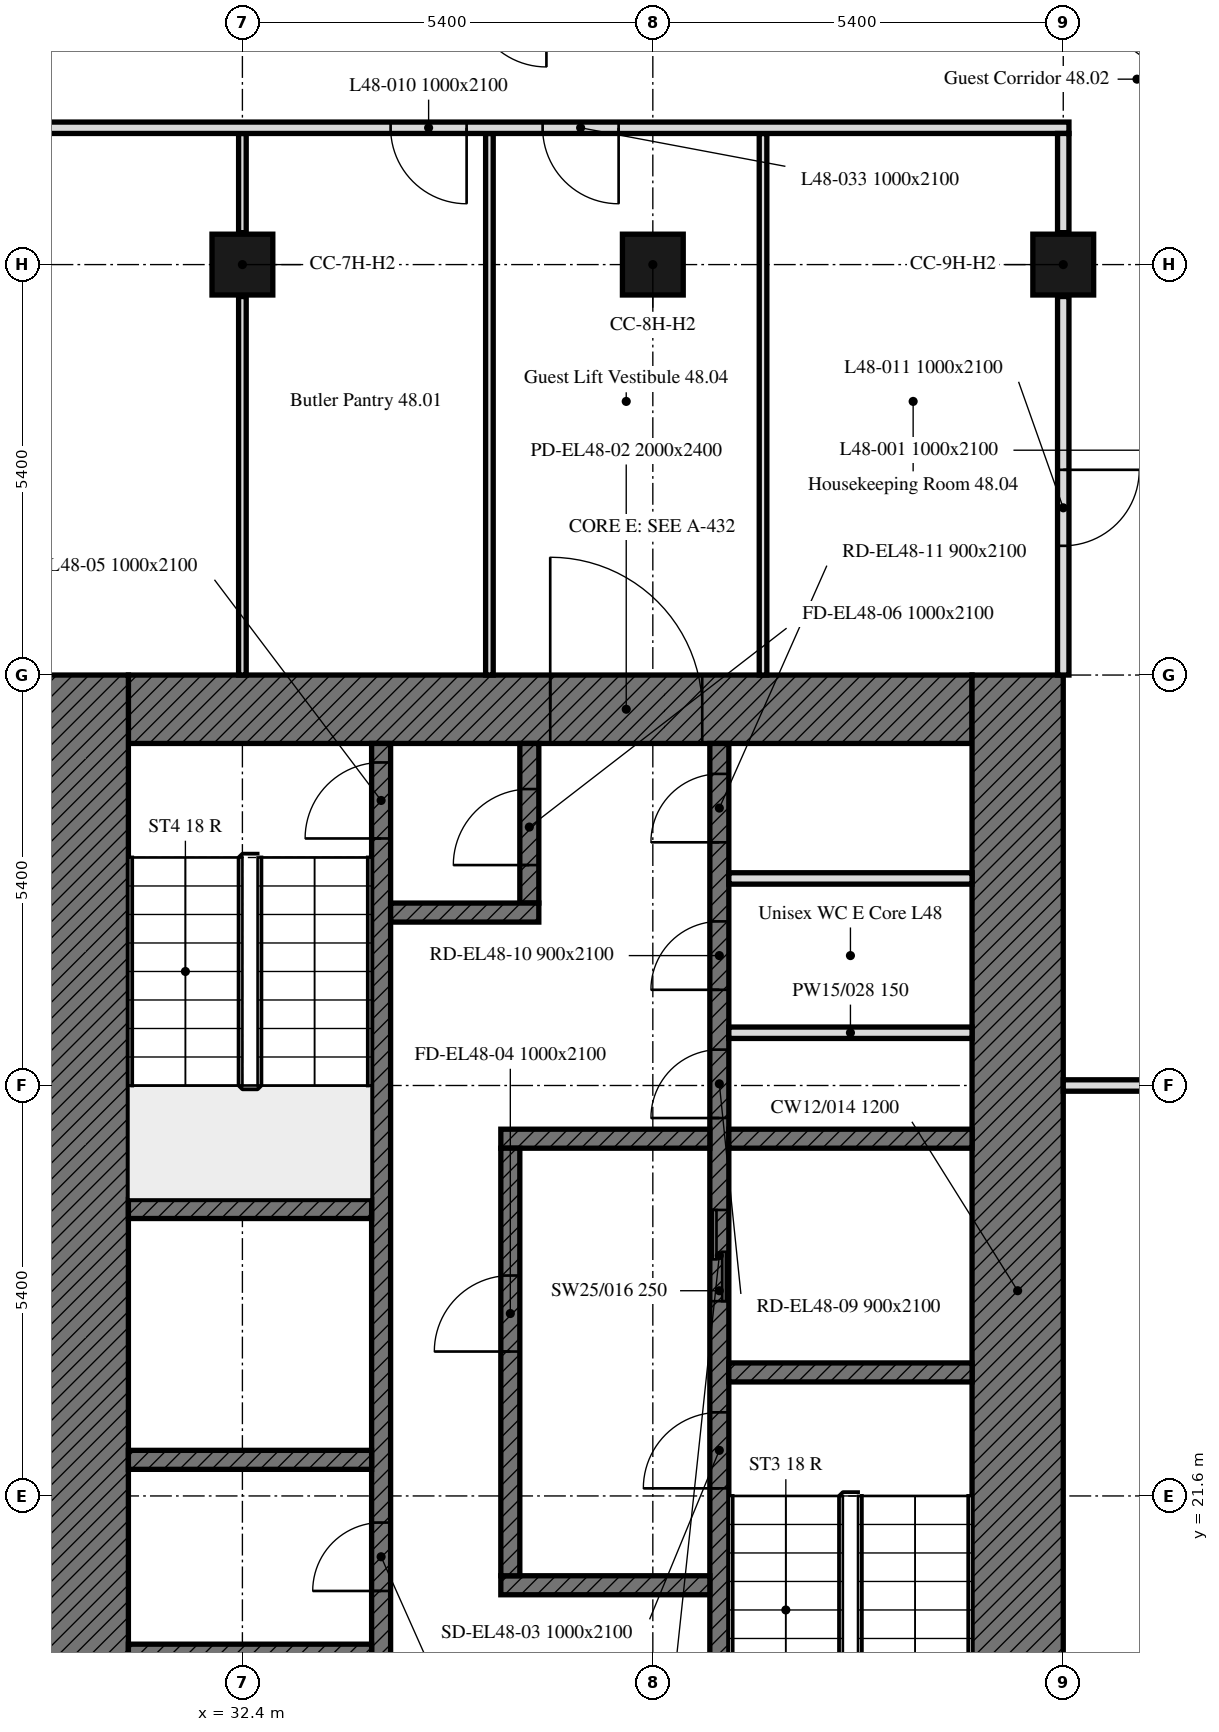
"""IFC4 building model, lengths in metres.
Left out: names, types, materials, properties, quantities, classifications, styles, units other than length and angle.
Written with IfcOpenShell. Run it as: python <this file> out.ifc"""

import sys

from ifc_helpers import new_model, si_unit, direction, frame, frame_2d, origin, origin_2d, place, context, subcontext, project, spatial, rectangle, extrude, element, fill, save


model = new_model("IFC4")
c1 = context("Model", 3, precision=1e-05, world=origin(), true_north=direction((0.0, 1.0)))
c2 = subcontext(c1, "Body", "Model", "MODEL_VIEW")
j1 = project(units=[si_unit("LENGTHUNIT", "METRE"), si_unit("PLANEANGLEUNIT", "RADIAN")], contexts=[c1])
p1 = place(None, origin())
s1 = spatial("IfcSite", under=j1, at=p1, CompositionType="ELEMENT")
p2 = place(p1, origin())
s2 = spatial("IfcBuilding", under=s1, at=p2, CompositionType="ELEMENT")
p3 = place(p2, frame((0.0, 0.0, 197.2)))
s3 = spatial("IfcBuildingStorey", under=s2, at=p3, CompositionType="ELEMENT", Elevation=197.2)
for number, where, z_axis, x_axis in (
    (1, (32.4, 37.8, 0.0), (0.0, 0.0, 1.0), (1.0, 0.0, 0.0)),
    (2, (37.8, 37.8, 0.0), (0.0, 0.0, 1.0), (1.0, 0.0, 0.0)),
    (3, (43.2, 37.8, 0.0), (0.0, 0.0, 1.0), (1.0, 0.0, 0.0)),
):
    element("IfcColumn", number, at=place(p3, frame(where, z_axis=z_axis, x_axis=x_axis)), inside=s3, PredefinedType="COLUMN", context=c2, shape_type="SweptSolid", body=[
        extrude(rectangle(XDim=0.8, YDim=0.8, at=origin_2d()), origin(), (0.0, 0.0, 1.0), 3.0),
    ])
p4 = place(p3, frame((30.9, 31.95, 0.0), z_axis=(0.0, 0.0, 1.0), x_axis=(1.0, 0.0, 0.0)))
e4 = element("IfcWall", 4, at=p4, inside=s3, PredefinedType="SOLIDWALL", context=c2, shape_type="SweptSolid", body=[
    extrude(rectangle(XDim=11.1, YDim=0.9, at=frame_2d((5.55, 0.0))), origin(), (0.0, 0.0, 1.0), 3.0),
])
p5 = place(p4, frame((5.55, 0.0, 0.0)))
e5 = element("IfcOpeningElement", 5, at=p5, cuts=e4, PredefinedType="OPENING", context=c2, shape_type="SweptSolid", body=[
    extrude(rectangle(XDim=2.0, YDim=2.4, at=frame_2d((1.0, 1.2))), frame((0.0, 0.45, 0.0), z_axis=(0.0, -1.0, 0.0), x_axis=(1.0, 0.0, 0.0)), (0.0, 0.0, 1.0), 0.9),
])
for number, where, z_axis, x_axis in (
    (6, (42.6, 32.4, 0.0), (0.0, 0.0, 1.0), (0.0, -1.0, 0.0)),
    (7, (30.3, 16.2, 0.0), (0.0, 0.0, 1.0), (0.0, 1.0, 0.0)),
):
    element("IfcWall", number, at=place(p3, frame(where, z_axis=z_axis, x_axis=x_axis)), inside=s3, PredefinedType="SOLIDWALL", context=c2, shape_type="SweptSolid", body=[
        extrude(rectangle(XDim=16.2, YDim=1.2, at=frame_2d((8.1, 0.0))), origin(), (0.0, 0.0, 1.0), 3.0),
    ])
p6 = place(p3, frame((38.675, 17.1, 0.0), z_axis=(0.0, 0.0, 1.0), x_axis=(0.0, 1.0, 0.0)))
e8 = element("IfcWall", 8, at=p6, inside=s3, PredefinedType="SOLIDWALL", context=c2, shape_type="SweptSolid", body=[
    extrude(rectangle(XDim=14.4, YDim=0.25, at=frame_2d((7.2, 0.0))), origin(), (0.0, 0.0, 1.0), 3.0),
])
p7 = place(p6, frame((4.6, 0.0, 0.0)))
e9 = element("IfcOpeningElement", 9, at=p7, cuts=e8, PredefinedType="OPENING", context=c2, shape_type="SweptSolid", body=[
    extrude(rectangle(XDim=1.0, YDim=2.1, at=frame_2d((0.5, 1.05))), frame((0.0, 0.125, 0.0), z_axis=(0.0, -1.0, 0.0), x_axis=(1.0, 0.0, 0.0)), (0.0, 0.0, 1.0), 0.25),
])
p8 = place(p6, frame((7.062, 0.0, 0.0)))
e10 = element("IfcOpeningElement", 10, at=p8, cuts=e8, PredefinedType="OPENING", context=c2, shape_type="SweptSolid", body=[
    extrude(rectangle(XDim=1.2, YDim=2.1, at=frame_2d((0.6, 1.05))), frame((0.0, 0.125, 0.0), z_axis=(0.0, -1.0, 0.0), x_axis=(1.0, 0.0, 0.0)), (0.0, 0.0, 1.0), 0.25),
])
p9 = place(p6, frame((9.472, 0.0, 0.0)))
e11 = element("IfcOpeningElement", 11, at=p9, cuts=e8, PredefinedType="OPENING", context=c2, shape_type="SweptSolid", body=[
    extrude(rectangle(XDim=0.9, YDim=2.1, at=frame_2d((0.45, 1.05))), frame((0.0, 0.125, 0.0), z_axis=(0.0, -1.0, 0.0), x_axis=(1.0, 0.0, 0.0)), (0.0, 0.0, 1.0), 0.25),
])
p10 = place(p6, frame((11.159, 0.0, 0.0)))
e12 = element("IfcOpeningElement", 12, at=p10, cuts=e8, PredefinedType="OPENING", context=c2, shape_type="SweptSolid", body=[
    extrude(rectangle(XDim=0.9, YDim=2.1, at=frame_2d((0.45, 1.05))), frame((0.0, 0.125, 0.0), z_axis=(0.0, -1.0, 0.0), x_axis=(1.0, 0.0, 0.0)), (0.0, 0.0, 1.0), 0.25),
])
p11 = place(p6, frame((13.1, 0.0, 0.0)))
e13 = element("IfcOpeningElement", 13, at=p11, cuts=e8, PredefinedType="OPENING", context=c2, shape_type="SweptSolid", body=[
    extrude(rectangle(XDim=0.9, YDim=2.1, at=frame_2d((0.45, 1.05))), frame((0.0, 0.125, 0.0), z_axis=(0.0, -1.0, 0.0), x_axis=(1.0, 0.0, 0.0)), (0.0, 0.0, 1.0), 0.25),
])
p12 = place(p3, frame((34.225, 17.1, 0.0), z_axis=(0.0, 0.0, 1.0), x_axis=(0.0, 1.0, 0.0)))
e14 = element("IfcWall", 14, at=p12, inside=s3, PredefinedType="SOLIDWALL", context=c2, shape_type="SweptSolid", body=[
    extrude(rectangle(XDim=14.4, YDim=0.25, at=frame_2d((7.2, 0.0))), origin(), (0.0, 0.0, 1.0), 3.0),
])
p13 = place(p12, frame((13.15, 0.0, 0.0)))
e15 = element("IfcOpeningElement", 15, at=p13, cuts=e14, PredefinedType="OPENING", context=c2, shape_type="SweptSolid", body=[
    extrude(rectangle(XDim=1.0, YDim=2.1, at=frame_2d((0.5, 1.05))), frame((0.0, 0.125, 0.0), z_axis=(0.0, -1.0, 0.0), x_axis=(1.0, 0.0, 0.0)), (0.0, 0.0, 1.0), 0.25),
])
p14 = place(p12, frame((0.6, 0.0, 0.0)))
e16 = element("IfcOpeningElement", 16, at=p14, cuts=e14, PredefinedType="OPENING", context=c2, shape_type="SweptSolid", body=[
    extrude(rectangle(XDim=1.1, YDim=2.1, at=frame_2d((0.55, 1.05))), frame((0.0, 0.125, 0.0), z_axis=(0.0, -1.0, 0.0), x_axis=(1.0, 0.0, 0.0)), (0.0, 0.0, 1.0), 0.25),
])
p15 = place(p12, frame((3.25, 0.0, 0.0)))
e17 = element("IfcOpeningElement", 17, at=p15, cuts=e14, PredefinedType="OPENING", context=c2, shape_type="SweptSolid", body=[
    extrude(rectangle(XDim=0.9, YDim=2.1, at=frame_2d((0.45, 1.05))), frame((0.0, 0.125, 0.0), z_axis=(0.0, -1.0, 0.0), x_axis=(1.0, 0.0, 0.0)), (0.0, 0.0, 1.0), 0.25),
])
p16 = place(p3, frame((38.8, 23.225, 0.0), z_axis=(0.0, 0.0, 1.0), x_axis=(1.0, 0.0, 0.0)))
e18 = element("IfcWall", 18, at=p16, inside=s3, PredefinedType="SOLIDWALL", context=c2, shape_type="SweptSolid", body=[
    extrude(rectangle(XDim=3.2, YDim=0.25, at=frame_2d((1.6, 0.0))), origin(), (0.0, 0.0, 1.0), 3.0),
])
for number, where, z_axis, x_axis in (
    (19, (30.9, 25.375, 0.0), (0.0, 0.0, 1.0), (1.0, 0.0, 0.0)),
    (20, (30.9, 22.075, 0.0), (0.0, 0.0, 1.0), (1.0, 0.0, 0.0)),
):
    element("IfcWall", number, at=place(p3, frame(where, z_axis=z_axis, x_axis=x_axis)), inside=s3, PredefinedType="SOLIDWALL", context=c2, shape_type="SweptSolid", body=[
        extrude(rectangle(XDim=3.2, YDim=0.25, at=frame_2d((1.6, 0.0))), origin(), (0.0, 0.0, 1.0), 3.0),
    ])
p17 = place(p3, frame((38.8, 26.3, 0.0), z_axis=(0.0, 0.0, 1.0), x_axis=(1.0, 0.0, 0.0)))
e21 = element("IfcWall", 21, at=p17, inside=s3, PredefinedType="SOLIDWALL", context=c2, shape_type="SweptSolid", body=[
    extrude(rectangle(XDim=3.2, YDim=0.25, at=frame_2d((1.6, 0.0))), origin(), (0.0, 0.0, 1.0), 3.0),
])
for number, where, z_axis, x_axis in (
    (22, (35.8, 26.3, 0.0), (0.0, 0.0, 1.0), (1.0, 0.0, 0.0)),
    (23, (35.8, 20.425, 0.0), (0.0, 0.0, 1.0), (1.0, 0.0, 0.0)),
):
    element("IfcWall", number, at=place(p3, frame(where, z_axis=z_axis, x_axis=x_axis)), inside=s3, PredefinedType="SOLIDWALL", context=c2, shape_type="SweptSolid", body=[
        extrude(rectangle(XDim=2.75, YDim=0.25, at=frame_2d((1.375, 0.0))), origin(), (0.0, 0.0, 1.0), 3.0),
    ])
p18 = place(p3, frame((36.175, 29.4, 0.0), z_axis=(0.0, 0.0, 1.0), x_axis=(0.0, 1.0, 0.0)))
e24 = element("IfcWall", 24, at=p18, inside=s3, PredefinedType="SOLIDWALL", context=c2, shape_type="SweptSolid", body=[
    extrude(rectangle(XDim=2.1, YDim=0.25, at=frame_2d((1.05, 0.0))), origin(), (0.0, 0.0, 1.0), 3.0),
])
p19 = place(p18, frame((0.5, 0.0, 0.0)))
e25 = element("IfcOpeningElement", 25, at=p19, cuts=e24, PredefinedType="OPENING", context=c2, shape_type="SweptSolid", body=[
    extrude(rectangle(XDim=1.0, YDim=2.1, at=frame_2d((0.5, 1.05))), frame((0.0, 0.125, 0.0), z_axis=(0.0, -1.0, 0.0), x_axis=(1.0, 0.0, 0.0)), (0.0, 0.0, 1.0), 0.25),
])
p20 = place(p3, frame((34.35, 29.275, 0.0), z_axis=(0.0, 0.0, 1.0), x_axis=(1.0, 0.0, 0.0)))
e26 = element("IfcWall", 26, at=p20, inside=s3, PredefinedType="SOLIDWALL", context=c2, shape_type="SweptSolid", body=[
    extrude(rectangle(XDim=1.95, YDim=0.25, at=frame_2d((0.975, 0.0))), origin(), (0.0, 0.0, 1.0), 3.0),
])
p21 = place(p3, frame((35.925, 20.55, 0.0), z_axis=(0.0, 0.0, 1.0), x_axis=(0.0, 1.0, 0.0)))
e27 = element("IfcWall", 27, at=p21, inside=s3, PredefinedType="SOLIDWALL", context=c2, shape_type="SweptSolid", body=[
    extrude(rectangle(XDim=5.625, YDim=0.25, at=frame_2d((2.812, 0.0))), origin(), (0.0, 0.0, 1.0), 3.0),
])
p22 = place(p21, frame((2.95, 0.0, 0.0)))
e28 = element("IfcOpeningElement", 28, at=p22, cuts=e27, PredefinedType="OPENING", context=c2, shape_type="SweptSolid", body=[
    extrude(rectangle(XDim=1.0, YDim=2.1, at=frame_2d((0.5, 1.05))), frame((0.0, 0.125, 0.0), z_axis=(0.0, -1.0, 0.0), x_axis=(1.0, 0.0, 0.0)), (0.0, 0.0, 1.0), 0.25),
])
p23 = place(p3, frame((30.9, 19.525, 0.0), z_axis=(0.0, 0.0, 1.0), x_axis=(1.0, 0.0, 0.0)))
e29 = element("IfcWall", 29, at=p23, inside=s3, PredefinedType="SOLIDWALL", context=c2, shape_type="SweptSolid", body=[
    extrude(rectangle(XDim=3.2, YDim=0.25, at=frame_2d((1.6, 0.0))), origin(), (0.0, 0.0, 1.0), 3.0),
])
for number, where, z_axis, x_axis in (
    (30, (38.8, 27.694, 0.0), (0.0, 0.0, 1.0), (1.0, 0.0, 0.0)),
    (31, (38.8, 29.724, 0.0), (0.0, 0.0, 1.0), (1.0, 0.0, 0.0)),
):
    element("IfcWall", number, at=place(p3, frame(where, z_axis=z_axis, x_axis=x_axis)), inside=s3, PredefinedType="PARTITIONING", context=c2, shape_type="SweptSolid", body=[
        extrude(rectangle(XDim=3.2, YDim=0.15, at=frame_2d((1.6, 0.0))), origin(), (0.0, 0.0, 1.0), 3.0),
    ])
p24 = place(p3, frame((32.4, 32.4, 0.0), z_axis=(0.0, 0.0, 1.0), x_axis=(0.0, 1.0, 0.0)))
e32 = element("IfcWall", 32, at=p24, inside=s3, PredefinedType="PARTITIONING", context=c2, shape_type="SweptSolid", body=[
    extrude(rectangle(XDim=4.98, YDim=0.1, at=frame_2d((2.49, 0.0))), origin(), (0.0, 0.0, 1.0), 2.4),
])
p25 = place(p3, frame((32.4, 38.22, 0.0), z_axis=(0.0, 0.0, 1.0), x_axis=(0.0, 1.0, 0.0)))
e33 = element("IfcWall", 33, at=p25, inside=s3, PredefinedType="PARTITIONING", context=c2, shape_type="SweptSolid", body=[
    extrude(rectangle(XDim=1.305, YDim=0.1, at=frame_2d((0.652, 0.0))), origin(), (0.0, 0.0, 1.0), 2.4),
])
for number, where, z_axis, x_axis in (
    (34, (35.65, 39.525, 0.0), (0.0, 0.0, 1.0), (0.0, -1.0, 0.0)),
    (35, (39.25, 32.4, 0.0), (0.0, 0.0, 1.0), (0.0, 1.0, 0.0)),
):
    element("IfcWall", number, at=place(p3, frame(where, z_axis=z_axis, x_axis=x_axis)), inside=s3, PredefinedType="PARTITIONING", context=c2, shape_type="SweptSolid", body=[
        extrude(rectangle(XDim=7.125, YDim=0.1, at=frame_2d((3.562, 0.0))), origin(), (0.0, 0.0, 1.0), 2.4),
    ])
p26 = place(p3, frame((43.2, 27.0, 0.0), z_axis=(0.0, 0.0, 1.0), x_axis=(1.0, 0.0, 0.0)))
e36 = element("IfcWall", 36, at=p26, inside=s3, PredefinedType="PARTITIONING", context=c2, shape_type="SweptSolid", body=[
    extrude(rectangle(XDim=2.025, YDim=0.15, at=frame_2d((1.013, 0.0))), origin(), (0.0, 0.0, 1.0), 2.4),
])
p27 = place(p3, frame((43.275, 39.6, 0.0), z_axis=(0.0, 0.0, 1.0), x_axis=(-1.0, 0.0, 0.0)))
e37 = element("IfcWall", 37, at=p27, inside=s3, PredefinedType="PARTITIONING", context=c2, shape_type="SweptSolid", body=[
    extrude(rectangle(XDim=36.049, YDim=0.15, at=frame_2d((18.024, 0.0))), origin(), (0.0, 0.0, 1.0), 2.4),
])
p28 = place(p27, frame((18.475, 0.0, 0.0)))
e38 = element("IfcOpeningElement", 38, at=p28, cuts=e37, PredefinedType="OPENING", context=c2, shape_type="SweptSolid", body=[
    extrude(rectangle(XDim=1.0, YDim=2.1, at=frame_2d((0.5, 1.05))), frame((0.0, 0.075, 0.0), z_axis=(0.0, -1.0, 0.0), x_axis=(1.0, 0.0, 0.0)), (0.0, 0.0, 1.0), 0.15),
])
p29 = place(p27, frame((34.799, 0.0, 0.0)))
e39 = element("IfcOpeningElement", 39, at=p29, cuts=e37, PredefinedType="OPENING", context=c2, shape_type="SweptSolid", body=[
    extrude(rectangle(XDim=1.0, YDim=2.1, at=frame_2d((0.5, 1.05))), frame((0.0, 0.075, 0.0), z_axis=(0.0, -1.0, 0.0), x_axis=(1.0, 0.0, 0.0)), (0.0, 0.0, 1.0), 0.15),
])
p30 = place(p27, frame((7.925, 0.0, 0.0)))
e40 = element("IfcOpeningElement", 40, at=p30, cuts=e37, PredefinedType="OPENING", context=c2, shape_type="SweptSolid", body=[
    extrude(rectangle(XDim=1.0, YDim=2.1, at=frame_2d((0.5, 1.05))), frame((0.0, 0.075, 0.0), z_axis=(0.0, -1.0, 0.0), x_axis=(1.0, 0.0, 0.0)), (0.0, 0.0, 1.0), 0.15),
])
p31 = place(p27, frame((29.025, 0.0, 0.0)))
e41 = element("IfcOpeningElement", 41, at=p31, cuts=e37, PredefinedType="OPENING", context=c2, shape_type="SweptSolid", body=[
    extrude(rectangle(XDim=1.0, YDim=2.1, at=frame_2d((0.5, 1.05))), frame((0.0, 0.075, 0.0), z_axis=(0.0, -1.0, 0.0), x_axis=(1.0, 0.0, 0.0)), (0.0, 0.0, 1.0), 0.15),
])
p32 = place(p27, frame((30.495, 0.0, 0.0)))
e42 = element("IfcOpeningElement", 42, at=p32, cuts=e37, PredefinedType="OPENING", context=c2, shape_type="SweptSolid", body=[
    extrude(rectangle(XDim=1.8, YDim=2.4, at=frame_2d((0.9, 1.2))), frame((0.0, 0.075, 0.0), z_axis=(0.0, -1.0, 0.0), x_axis=(1.0, 0.0, 0.0)), (0.0, 0.0, 1.0), 0.15),
])
p33 = place(p27, frame((5.925, 0.0, 0.0)))
e43 = element("IfcOpeningElement", 43, at=p33, cuts=e37, PredefinedType="OPENING", context=c2, shape_type="SweptSolid", body=[
    extrude(rectangle(XDim=1.0, YDim=2.1, at=frame_2d((0.5, 1.05))), frame((0.0, 0.075, 0.0), z_axis=(0.0, -1.0, 0.0), x_axis=(1.0, 0.0, 0.0)), (0.0, 0.0, 1.0), 0.15),
])
p34 = place(p3, frame((43.2, 39.525, 0.0), z_axis=(0.0, 0.0, 1.0), x_axis=(0.0, -1.0, 0.0)))
e44 = element("IfcWall", 44, at=p34, inside=s3, PredefinedType="PARTITIONING", context=c2, shape_type="SweptSolid", body=[
    extrude(rectangle(XDim=1.305, YDim=0.15, at=frame_2d((0.652, 0.0))), origin(), (0.0, 0.0, 1.0), 3.0),
])
p35 = place(p3, frame((43.2, 37.38, 0.0), z_axis=(0.0, 0.0, 1.0), x_axis=(0.0, -1.0, 0.0)))
e45 = element("IfcWall", 45, at=p35, inside=s3, PredefinedType="PARTITIONING", context=c2, shape_type="SweptSolid", body=[
    extrude(rectangle(XDim=4.98, YDim=0.15, at=frame_2d((2.49, 0.0))), origin(), (0.0, 0.0, 1.0), 3.0),
])
p36 = place(p35, frame((2.28, 0.0, 0.0)))
e46 = element("IfcOpeningElement", 46, at=p36, cuts=e45, PredefinedType="OPENING", context=c2, shape_type="SweptSolid", body=[
    extrude(rectangle(XDim=1.0, YDim=2.1, at=frame_2d((0.5, 1.05))), frame((0.0, 0.075, 0.0), z_axis=(0.0, -1.0, 0.0), x_axis=(1.0, 0.0, 0.0)), (0.0, 0.0, 1.0), 0.15),
])
p37 = place(p5, origin())
e47 = element("IfcDoor", 47, at=p37, inside=s3, OperationType="DOUBLE_DOOR_SINGLE_SWING", PredefinedType="DOOR", context=c2, shape_type="SweptSolid", body=[
    extrude(rectangle(XDim=2.0, YDim=2.4, at=frame_2d((1.0, 1.2))), frame((0.0, 0.025, 0.0), z_axis=(0.0, -1.0, 0.0), x_axis=(1.0, 0.0, 0.0)), (0.0, 0.0, 1.0), 0.05),
])
fill(e5, e47)
p38 = place(p7, origin())
e48 = element("IfcDoor", 48, at=p38, inside=s3, OperationType="SINGLE_SWING_LEFT", PredefinedType="DOOR", context=c2, shape_type="SweptSolid", body=[
    extrude(rectangle(XDim=1.0, YDim=2.1, at=frame_2d((0.5, 1.05))), frame((0.0, 0.025, 0.0), z_axis=(0.0, -1.0, 0.0), x_axis=(1.0, 0.0, 0.0)), (0.0, 0.0, 1.0), 0.05),
])
fill(e9, e48)
p39 = place(p22, origin())
e49 = element("IfcDoor", 49, at=p39, inside=s3, OperationType="SINGLE_SWING_LEFT", PredefinedType="DOOR", context=c2, shape_type="SweptSolid", body=[
    extrude(rectangle(XDim=1.0, YDim=2.1, at=frame_2d((0.5, 1.05))), frame((0.0, 0.025, 0.0), z_axis=(0.0, -1.0, 0.0), x_axis=(1.0, 0.0, 0.0)), (0.0, 0.0, 1.0), 0.05),
])
fill(e28, e49)
p40 = place(p13, origin())
e50 = element("IfcDoor", 50, at=p40, inside=s3, OperationType="SINGLE_SWING_LEFT", PredefinedType="DOOR", context=c2, shape_type="SweptSolid", body=[
    extrude(rectangle(XDim=1.0, YDim=2.1, at=frame_2d((0.5, 1.05))), frame((0.0, 0.025, 0.0), z_axis=(0.0, -1.0, 0.0), x_axis=(1.0, 0.0, 0.0)), (0.0, 0.0, 1.0), 0.05),
])
fill(e15, e50)
p41 = place(p19, origin())
e51 = element("IfcDoor", 51, at=p41, inside=s3, OperationType="SINGLE_SWING_LEFT", PredefinedType="DOOR", context=c2, shape_type="SweptSolid", body=[
    extrude(rectangle(XDim=1.0, YDim=2.1, at=frame_2d((0.5, 1.05))), frame((0.0, 0.025, 0.0), z_axis=(0.0, -1.0, 0.0), x_axis=(1.0, 0.0, 0.0)), (0.0, 0.0, 1.0), 0.05),
])
fill(e25, e51)
p42 = place(p8, origin())
e52 = element("IfcDoor", 52, at=p42, inside=s3, OperationType="DOUBLE_DOOR_SLIDING", PredefinedType="DOOR", context=c2, shape_type="SweptSolid", body=[
    extrude(rectangle(XDim=1.2, YDim=2.1, at=frame_2d((0.6, 1.05))), frame((0.0, 0.025, 0.0), z_axis=(0.0, -1.0, 0.0), x_axis=(1.0, 0.0, 0.0)), (0.0, 0.0, 1.0), 0.05),
])
fill(e10, e52)
p43 = place(p9, origin())
e53 = element("IfcDoor", 53, at=p43, inside=s3, OperationType="SINGLE_SWING_LEFT", PredefinedType="DOOR", context=c2, shape_type="SweptSolid", body=[
    extrude(rectangle(XDim=0.9, YDim=2.1, at=frame_2d((0.45, 1.05))), frame((0.0, 0.025, 0.0), z_axis=(0.0, -1.0, 0.0), x_axis=(1.0, 0.0, 0.0)), (0.0, 0.0, 1.0), 0.05),
])
fill(e11, e53)
p44 = place(p10, origin())
e54 = element("IfcDoor", 54, at=p44, inside=s3, OperationType="SINGLE_SWING_LEFT", PredefinedType="DOOR", context=c2, shape_type="SweptSolid", body=[
    extrude(rectangle(XDim=0.9, YDim=2.1, at=frame_2d((0.45, 1.05))), frame((0.0, 0.025, 0.0), z_axis=(0.0, -1.0, 0.0), x_axis=(1.0, 0.0, 0.0)), (0.0, 0.0, 1.0), 0.05),
])
fill(e12, e54)
p45 = place(p11, origin())
e55 = element("IfcDoor", 55, at=p45, inside=s3, OperationType="SINGLE_SWING_LEFT", PredefinedType="DOOR", context=c2, shape_type="SweptSolid", body=[
    extrude(rectangle(XDim=0.9, YDim=2.1, at=frame_2d((0.45, 1.05))), frame((0.0, 0.025, 0.0), z_axis=(0.0, -1.0, 0.0), x_axis=(1.0, 0.0, 0.0)), (0.0, 0.0, 1.0), 0.05),
])
fill(e13, e55)
p46 = place(p15, origin())
e56 = element("IfcDoor", 56, at=p46, inside=s3, OperationType="SINGLE_SWING_LEFT", PredefinedType="DOOR", context=c2, shape_type="SweptSolid", body=[
    extrude(rectangle(XDim=0.9, YDim=2.1, at=frame_2d((0.45, 1.05))), frame((0.0, 0.025, 0.0), z_axis=(0.0, -1.0, 0.0), x_axis=(1.0, 0.0, 0.0)), (0.0, 0.0, 1.0), 0.05),
])
fill(e17, e56)
p47 = place(p30, origin())
e57 = element("IfcDoor", 57, at=p47, inside=s3, OperationType="SINGLE_SWING_RIGHT", PredefinedType="DOOR", context=c2, shape_type="SweptSolid", body=[
    extrude(rectangle(XDim=1.0, YDim=2.1, at=frame_2d((0.5, 1.05))), frame((0.0, 0.025, 0.0), z_axis=(0.0, -1.0, 0.0), x_axis=(1.0, 0.0, 0.0)), (0.0, 0.0, 1.0), 0.05),
])
fill(e40, e57)
p48 = place(p36, origin())
e58 = element("IfcDoor", 58, at=p48, inside=s3, OperationType="SINGLE_SWING_LEFT", PredefinedType="DOOR", context=c2, shape_type="SweptSolid", body=[
    extrude(rectangle(XDim=1.0, YDim=2.1, at=frame_2d((0.5, 1.05))), frame((0.0, 0.025, 0.0), z_axis=(0.0, -1.0, 0.0), x_axis=(1.0, 0.0, 0.0)), (0.0, 0.0, 1.0), 0.05),
])
fill(e46, e58)
p49 = place(p33, origin())
e59 = element("IfcDoor", 59, at=p49, inside=s3, OperationType="SINGLE_SWING_RIGHT", PredefinedType="DOOR", context=c2, shape_type="SweptSolid", body=[
    extrude(rectangle(XDim=1.0, YDim=2.1, at=frame_2d((0.5, 1.05))), frame((0.0, 0.025, 0.0), z_axis=(0.0, -1.0, 0.0), x_axis=(1.0, 0.0, 0.0)), (0.0, 0.0, 1.0), 0.05),
])
fill(e43, e59)
save(model, sys.argv[1])
